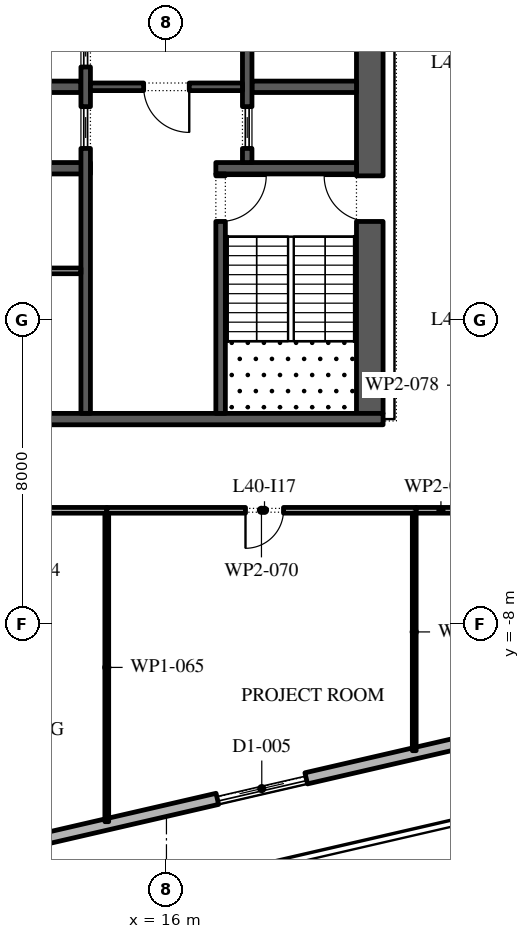
"""IFC4 building model, lengths in metres.
Left out: names, types, materials, properties, quantities, classifications, styles, units other than length and angle.
Written with IfcOpenShell. Run it as: python <this file> out.ifc"""

import sys

from ifc_helpers import new_model, si_unit, direction, frame, frame_2d, origin, place, context, subcontext, project, spatial, rectangle, extrude, element, fill, save


model = new_model("IFC4")
c1 = context("Model", 3, precision=1e-05, world=origin(), true_north=direction((0.0, 1.0)))
c2 = subcontext(c1, "Body", "Model", "MODEL_VIEW")
j1 = project(units=[si_unit("LENGTHUNIT", "METRE"), si_unit("PLANEANGLEUNIT", "RADIAN")], contexts=[c1])
p1 = place(None, origin())
s1 = spatial("IfcSite", under=j1, at=p1, CompositionType="ELEMENT")
p2 = place(p1, origin())
s2 = spatial("IfcBuilding", under=s1, at=p2, CompositionType="ELEMENT")
p3 = place(p2, frame((0.0, 0.0, 184.2)))
s3 = spatial("IfcBuildingStorey", under=s2, at=p3, CompositionType="ELEMENT", Elevation=184.2)
p4 = place(p3, frame((-17.592, -20.657, 0.0), z_axis=(0.0, 0.0, 1.0), x_axis=(0.974370243697, 0.224950279389, 0.0)))
e1 = element("IfcWall", 1, at=p4, inside=s3, PredefinedType="STANDARD", context=c2, shape_type="SweptSolid", body=[
    extrude(rectangle(XDim=49.5, YDim=0.3, at=frame_2d((24.75, 0.0))), origin(), (0.0, 0.0, 1.0), 4.0),
])
p5 = place(p4, frame((2.8, 0.0, 0.0)))
e2 = element("IfcOpeningElement", 2, at=p5, cuts=e1, PredefinedType="OPENING", context=c2, shape_type="SweptSolid", body=[
    extrude(rectangle(XDim=2.4, YDim=3.5, at=frame_2d((1.2, 1.75))), frame((0.0, 0.16, 0.0), z_axis=(0.0, -1.0, 0.0), x_axis=(1.0, 0.0, 0.0)), (0.0, 0.0, 1.0), 0.32),
])
p6 = place(p4, frame((9.9, 0.0, 0.45)))
e3 = element("IfcOpeningElement", 3, at=p6, cuts=e1, PredefinedType="OPENING", context=c2, shape_type="SweptSolid", body=[
    extrude(rectangle(XDim=4.5, YDim=2.575, at=frame_2d((2.25, 1.288))), frame((0.0, 0.16, 0.0), z_axis=(0.0, -1.0, 0.0), x_axis=(1.0, 0.0, 0.0)), (0.0, 0.0, 1.0), 0.32),
])
p7 = place(p4, frame((18.2, 0.0, 0.45)))
e4 = element("IfcOpeningElement", 4, at=p7, cuts=e1, PredefinedType="OPENING", context=c2, shape_type="SweptSolid", body=[
    extrude(rectangle(XDim=4.5, YDim=3.05, at=frame_2d((2.25, 1.525))), frame((0.0, 0.16, 0.0), z_axis=(0.0, -1.0, 0.0), x_axis=(1.0, 0.0, 0.0)), (0.0, 0.0, 1.0), 0.32),
])
p8 = place(p4, frame((26.5, 0.0, 0.45)))
e5 = element("IfcOpeningElement", 5, at=p8, cuts=e1, PredefinedType="OPENING", context=c2, shape_type="SweptSolid", body=[
    extrude(rectangle(XDim=4.5, YDim=2.75, at=frame_2d((2.25, 1.375))), frame((0.0, 0.16, 0.0), z_axis=(0.0, -1.0, 0.0), x_axis=(1.0, 0.0, 0.0)), (0.0, 0.0, 1.0), 0.32),
])
p9 = place(p4, frame((35.85, 0.0, 0.0)))
e6 = element("IfcOpeningElement", 6, at=p9, cuts=e1, PredefinedType="OPENING", context=c2, shape_type="SweptSolid", body=[
    extrude(rectangle(XDim=2.4, YDim=3.5, at=frame_2d((1.2, 1.75))), frame((0.0, 0.16, 0.0), z_axis=(0.0, -1.0, 0.0), x_axis=(1.0, 0.0, 0.0)), (0.0, 0.0, 1.0), 0.32),
])
p10 = place(p4, frame((43.1, 0.0, 0.45)))
e7 = element("IfcOpeningElement", 7, at=p10, cuts=e1, PredefinedType="OPENING", context=c2, shape_type="SweptSolid", body=[
    extrude(rectangle(XDim=4.5, YDim=2.875, at=frame_2d((2.25, 1.438))), frame((0.0, 0.16, 0.0), z_axis=(0.0, -1.0, 0.0), x_axis=(1.0, 0.0, 0.0)), (0.0, 0.0, 1.0), 0.32),
])
p11 = place(p3, frame((33.157, -5.092, 0.0), z_axis=(0.0, 0.0, 1.0), x_axis=(-0.224950279389, 0.974370243697, 0.0)))
e8 = element("IfcWall", 8, at=p11, inside=s3, PredefinedType="STANDARD", context=c2, shape_type="SweptSolid", body=[
    extrude(rectangle(XDim=49.5, YDim=0.3, at=frame_2d((24.75, 0.0))), origin(), (0.0, 0.0, 1.0), 4.0),
])
p12 = place(p11, frame((2.207, 0.0, 0.0)))
e9 = element("IfcOpeningElement", 9, at=p12, cuts=e8, PredefinedType="OPENING", context=c2, shape_type="SweptSolid", body=[
    extrude(rectangle(XDim=2.4, YDim=3.125, at=frame_2d((1.2, 1.562))), frame((0.0, 0.16, 0.0), z_axis=(0.0, -1.0, 0.0), x_axis=(1.0, 0.0, 0.0)), (0.0, 0.0, 1.0), 0.32),
])
p13 = place(p11, frame((8.121, 0.0, 0.45)))
e10 = element("IfcOpeningElement", 10, at=p13, cuts=e8, PredefinedType="OPENING", context=c2, shape_type="SweptSolid", body=[
    extrude(rectangle(XDim=4.5, YDim=2.875, at=frame_2d((2.25, 1.438))), frame((0.0, 0.16, 0.0), z_axis=(0.0, -1.0, 0.0), x_axis=(1.0, 0.0, 0.0)), (0.0, 0.0, 1.0), 0.32),
])
p14 = place(p11, frame((15.236, 0.0, 0.45)))
e11 = element("IfcOpeningElement", 11, at=p14, cuts=e8, PredefinedType="OPENING", context=c2, shape_type="SweptSolid", body=[
    extrude(rectangle(XDim=4.5, YDim=2.875, at=frame_2d((2.25, 1.438))), frame((0.0, 0.16, 0.0), z_axis=(0.0, -1.0, 0.0), x_axis=(1.0, 0.0, 0.0)), (0.0, 0.0, 1.0), 0.32),
])
p15 = place(p11, frame((22.35, 0.0, 0.45)))
e12 = element("IfcOpeningElement", 12, at=p15, cuts=e8, PredefinedType="OPENING", context=c2, shape_type="SweptSolid", body=[
    extrude(rectangle(XDim=4.5, YDim=3.0, at=frame_2d((2.25, 1.5))), frame((0.0, 0.16, 0.0), z_axis=(0.0, -1.0, 0.0), x_axis=(1.0, 0.0, 0.0)), (0.0, 0.0, 1.0), 0.32),
])
p16 = place(p11, frame((30.514, 0.0, 0.0)))
e13 = element("IfcOpeningElement", 13, at=p16, cuts=e8, PredefinedType="OPENING", context=c2, shape_type="SweptSolid", body=[
    extrude(rectangle(XDim=2.4, YDim=3.45, at=frame_2d((1.2, 1.725))), frame((0.0, 0.16, 0.0), z_axis=(0.0, -1.0, 0.0), x_axis=(1.0, 0.0, 0.0)), (0.0, 0.0, 1.0), 0.32),
])
p17 = place(p11, frame((36.579, 0.0, 0.45)))
e14 = element("IfcOpeningElement", 14, at=p17, cuts=e8, PredefinedType="OPENING", context=c2, shape_type="SweptSolid", body=[
    extrude(rectangle(XDim=4.5, YDim=3.05, at=frame_2d((2.25, 1.525))), frame((0.0, 0.16, 0.0), z_axis=(0.0, -1.0, 0.0), x_axis=(1.0, 0.0, 0.0)), (0.0, 0.0, 1.0), 0.32),
])
p18 = place(p11, frame((43.693, 0.0, 0.45)))
e15 = element("IfcOpeningElement", 15, at=p18, cuts=e8, PredefinedType="OPENING", context=c2, shape_type="SweptSolid", body=[
    extrude(rectangle(XDim=4.5, YDim=3.05, at=frame_2d((2.25, 1.525))), frame((0.0, 0.16, 0.0), z_axis=(0.0, -1.0, 0.0), x_axis=(1.0, 0.0, 0.0)), (0.0, 0.0, 1.0), 0.32),
])
p19 = place(p3, frame((21.35, -2.45, 0.0), z_axis=(0.0, 0.0, 1.0), x_axis=(0.0, 1.0, 0.0)))
e16 = element("IfcWall", 16, at=p19, inside=s3, PredefinedType="SHEAR", context=c2, shape_type="SweptSolid", body=[
    extrude(rectangle(XDim=27.9, YDim=0.7, at=frame_2d((13.95, 0.0))), origin(), (0.0, 0.0, 1.0), 4.0),
])
p20 = place(p19, frame((5.05, 0.0, 0.0)))
e17 = element("IfcOpeningElement", 17, at=p20, cuts=e16, PredefinedType="OPENING", context=c2, shape_type="SweptSolid", body=[
    extrude(rectangle(XDim=1.2, YDim=2.1, at=frame_2d((0.6, 1.05))), frame((0.0, 0.36, 0.0), z_axis=(0.0, -1.0, 0.0), x_axis=(1.0, 0.0, 0.0)), (0.0, 0.0, 1.0), 0.72),
])
p21 = place(p19, frame((21.65, 0.0, 0.0)))
e18 = element("IfcOpeningElement", 18, at=p21, cuts=e16, PredefinedType="OPENING", context=c2, shape_type="SweptSolid", body=[
    extrude(rectangle(XDim=1.2, YDim=2.1, at=frame_2d((0.6, 1.05))), frame((0.0, 0.36, 0.0), z_axis=(0.0, -1.0, 0.0), x_axis=(1.0, 0.0, 0.0)), (0.0, 0.0, 1.0), 0.72),
])
p22 = place(p3, frame((10.3, -2.6, 0.0), z_axis=(0.0, 0.0, 1.0), x_axis=(1.0, 0.0, 0.0)))
e19 = element("IfcWall", 19, at=p22, inside=s3, PredefinedType="SHEAR", context=c2, shape_type="SweptSolid", body=[
    extrude(rectangle(XDim=11.4, YDim=0.3, at=frame_2d((5.7, 0.0))), origin(), (0.0, 0.0, 1.0), 4.0),
])
p23 = place(p3, frame((17.3, 4.0, 0.0), z_axis=(0.0, 0.0, 1.0), x_axis=(1.0, 0.0, 0.0)))
e20 = element("IfcWall", 20, at=p23, inside=s3, PredefinedType="SHEAR", context=c2, shape_type="SweptSolid", body=[
    extrude(rectangle(XDim=3.7, YDim=0.3, at=frame_2d((1.85, 0.0))), origin(), (0.0, 0.0, 1.0), 4.0),
])
p24 = place(p3, frame((17.425, -2.45, 0.0), z_axis=(0.0, 0.0, 1.0), x_axis=(0.0, 1.0, 0.0)))
e21 = element("IfcWall", 21, at=p24, inside=s3, PredefinedType="SHEAR", context=c2, shape_type="SweptSolid", body=[
    extrude(rectangle(XDim=6.3, YDim=0.25, at=frame_2d((3.15, 0.0))), origin(), (0.0, 0.0, 1.0), 4.0),
])
p25 = place(p24, frame((5.05, 0.0, 0.0)))
e22 = element("IfcOpeningElement", 22, at=p25, cuts=e21, PredefinedType="OPENING", context=c2, shape_type="SweptSolid", body=[
    extrude(rectangle(XDim=1.2, YDim=2.1, at=frame_2d((0.6, 1.05))), frame((0.0, 0.135, 0.0), z_axis=(0.0, -1.0, 0.0), x_axis=(1.0, 0.0, 0.0)), (0.0, 0.0, 1.0), 0.27),
])
p26 = place(p3, frame((18.25, 6.143, 0.0), z_axis=(0.0, 0.0, 1.0), x_axis=(1.0, 0.0, 0.0)))
e23 = element("IfcWall", 23, at=p26, inside=s3, PredefinedType="SHEAR", context=c2, shape_type="SweptSolid", body=[
    extrude(rectangle(XDim=2.75, YDim=0.3, at=frame_2d((1.375, 0.0))), origin(), (0.0, 0.0, 1.0), 4.0),
])
p27 = place(p3, frame((18.125, 4.15, 0.0), z_axis=(0.0, 0.0, 1.0), x_axis=(0.0, 1.0, 0.0)))
e24 = element("IfcWall", 24, at=p27, inside=s3, PredefinedType="SHEAR", context=c2, shape_type="SweptSolid", body=[
    extrude(rectangle(XDim=14.7, YDim=0.25, at=frame_2d((7.35, 0.0))), origin(), (0.0, 0.0, 1.0), 4.0),
])
p28 = place(p27, frame((3.446, 0.0, 0.0)))
e25 = element("IfcOpeningElement", 25, at=p28, cuts=e24, PredefinedType="OPENING", context=c2, shape_type="SweptSolid", body=[
    extrude(rectangle(XDim=0.9, YDim=2.1, at=frame_2d((0.45, 1.05))), frame((0.0, 0.135, 0.0), z_axis=(0.0, -1.0, 0.0), x_axis=(1.0, 0.0, 0.0)), (0.0, 0.0, 1.0), 0.27),
])
p29 = place(p27, frame((6.9, 0.0, 0.0)))
e26 = element("IfcOpeningElement", 26, at=p29, cuts=e24, PredefinedType="OPENING", context=c2, shape_type="SweptSolid", body=[
    extrude(rectangle(XDim=0.9, YDim=2.1, at=frame_2d((0.45, 1.05))), frame((0.0, 0.135, 0.0), z_axis=(0.0, -1.0, 0.0), x_axis=(1.0, 0.0, 0.0)), (0.0, 0.0, 1.0), 0.27),
])
p30 = place(p27, frame((10.354, 0.0, 0.0)))
e27 = element("IfcOpeningElement", 27, at=p30, cuts=e24, PredefinedType="OPENING", context=c2, shape_type="SweptSolid", body=[
    extrude(rectangle(XDim=0.9, YDim=2.1, at=frame_2d((0.45, 1.05))), frame((0.0, 0.135, 0.0), z_axis=(0.0, -1.0, 0.0), x_axis=(1.0, 0.0, 0.0)), (0.0, 0.0, 1.0), 0.27),
])
p31 = place(p27, frame((0.371, 0.0, 0.0)))
e28 = element("IfcOpeningElement", 28, at=p31, cuts=e24, PredefinedType="OPENING", context=c2, shape_type="SweptSolid", body=[
    extrude(rectangle(XDim=1.1, YDim=2.1, at=frame_2d((0.55, 1.05))), frame((0.0, 0.135, 0.0), z_axis=(0.0, -1.0, 0.0), x_axis=(1.0, 0.0, 0.0)), (0.0, 0.0, 1.0), 0.27),
])
p32 = place(p27, frame((13.229, 0.0, 0.0)))
e29 = element("IfcOpeningElement", 29, at=p32, cuts=e24, PredefinedType="OPENING", context=c2, shape_type="SweptSolid", body=[
    extrude(rectangle(XDim=1.1, YDim=2.1, at=frame_2d((0.55, 1.05))), frame((0.0, 0.135, 0.0), z_axis=(0.0, -1.0, 0.0), x_axis=(1.0, 0.0, 0.0)), (0.0, 0.0, 1.0), 0.27),
])
p33 = place(p3, frame((11.0, 4.0, 0.0), z_axis=(0.0, 0.0, 1.0), x_axis=(1.0, 0.0, 0.0)))
e30 = element("IfcWall", 30, at=p33, inside=s3, PredefinedType="SHEAR", context=c2, shape_type="SweptSolid", body=[
    extrude(rectangle(XDim=3.0, YDim=0.3, at=frame_2d((1.5, 0.0))), origin(), (0.0, 0.0, 1.0), 4.0),
])
p34 = place(p3, frame((11.0, 6.143, 0.0), z_axis=(0.0, 0.0, 1.0), x_axis=(1.0, 0.0, 0.0)))
e31 = element("IfcWall", 31, at=p34, inside=s3, PredefinedType="SHEAR", context=c2, shape_type="SweptSolid", body=[
    extrude(rectangle(XDim=2.75, YDim=0.3, at=frame_2d((1.375, 0.0))), origin(), (0.0, 0.0, 1.0), 4.0),
])
p35 = place(p3, frame((13.875, -2.45, 0.0), z_axis=(0.0, 0.0, 1.0), x_axis=(0.0, 1.0, 0.0)))
e32 = element("IfcWall", 32, at=p35, inside=s3, PredefinedType="SHEAR", context=c2, shape_type="SweptSolid", body=[
    extrude(rectangle(XDim=21.3, YDim=0.25, at=frame_2d((10.65, 0.0))), origin(), (0.0, 0.0, 1.0), 4.0),
])
p36 = place(p35, frame((17.786, 0.0, 0.0)))
e33 = element("IfcOpeningElement", 33, at=p36, cuts=e32, PredefinedType="OPENING", context=c2, shape_type="SweptSolid", body=[
    extrude(rectangle(XDim=0.9, YDim=2.1, at=frame_2d((0.45, 1.05))), frame((0.0, 0.135, 0.0), z_axis=(0.0, -1.0, 0.0), x_axis=(1.0, 0.0, 0.0)), (0.0, 0.0, 1.0), 0.27),
])
p37 = place(p35, frame((6.971, 0.0, 0.0)))
e34 = element("IfcOpeningElement", 34, at=p37, cuts=e32, PredefinedType="OPENING", context=c2, shape_type="SweptSolid", body=[
    extrude(rectangle(XDim=1.1, YDim=2.1, at=frame_2d((0.55, 1.05))), frame((0.0, 0.135, 0.0), z_axis=(0.0, -1.0, 0.0), x_axis=(1.0, 0.0, 0.0)), (0.0, 0.0, 1.0), 0.27),
])
p38 = place(p35, frame((9.114, 0.0, 0.0)))
e35 = element("IfcOpeningElement", 35, at=p38, cuts=e32, PredefinedType="OPENING", context=c2, shape_type="SweptSolid", body=[
    extrude(rectangle(XDim=1.1, YDim=2.1, at=frame_2d((0.55, 1.05))), frame((0.0, 0.135, 0.0), z_axis=(0.0, -1.0, 0.0), x_axis=(1.0, 0.0, 0.0)), (0.0, 0.0, 1.0), 0.27),
])
p39 = place(p35, frame((11.257, 0.0, 0.0)))
e36 = element("IfcOpeningElement", 36, at=p39, cuts=e32, PredefinedType="OPENING", context=c2, shape_type="SweptSolid", body=[
    extrude(rectangle(XDim=1.1, YDim=2.1, at=frame_2d((0.55, 1.05))), frame((0.0, 0.135, 0.0), z_axis=(0.0, -1.0, 0.0), x_axis=(1.0, 0.0, 0.0)), (0.0, 0.0, 1.0), 0.27),
])
p40 = place(p35, frame((13.4, 0.0, 0.0)))
e37 = element("IfcOpeningElement", 37, at=p40, cuts=e32, PredefinedType="OPENING", context=c2, shape_type="SweptSolid", body=[
    extrude(rectangle(XDim=1.1, YDim=2.1, at=frame_2d((0.55, 1.05))), frame((0.0, 0.135, 0.0), z_axis=(0.0, -1.0, 0.0), x_axis=(1.0, 0.0, 0.0)), (0.0, 0.0, 1.0), 0.27),
])
p41 = place(p3, frame((14.0, 6.143, 0.0), z_axis=(0.0, 0.0, 1.0), x_axis=(1.0, 0.0, 0.0)))
e38 = element("IfcWall", 38, at=p41, inside=s3, PredefinedType="SHEAR", context=c2, shape_type="SweptSolid", body=[
    extrude(rectangle(XDim=4.0, YDim=0.2, at=frame_2d((2.0, 0.0))), origin(), (0.0, 0.0, 1.0), 4.0),
])
p42 = place(p41, frame((1.4, 0.0, 0.0)))
e39 = element("IfcOpeningElement", 39, at=p42, cuts=e38, PredefinedType="OPENING", context=c2, shape_type="SweptSolid", body=[
    extrude(rectangle(XDim=1.2, YDim=2.1, at=frame_2d((0.6, 1.05))), frame((0.0, 0.11, 0.0), z_axis=(0.0, -1.0, 0.0), x_axis=(1.0, 0.0, 0.0)), (0.0, 0.0, 1.0), 0.22),
])
p43 = place(p3, frame((11.0, 1.3, 0.0), z_axis=(0.0, 0.0, 1.0), x_axis=(1.0, 0.0, 0.0)))
e40 = element("IfcWall", 40, at=p43, inside=s3, PredefinedType="PARTITIONING", context=c2, shape_type="SweptSolid", body=[
    extrude(rectangle(XDim=2.75, YDim=0.15, at=frame_2d((1.375, 0.0))), origin(), (0.0, 0.0, 1.0), 4.0),
])
p44 = place(p3, frame((14.43, -5.0, 0.0), z_axis=(0.0, 0.0, 1.0), x_axis=(-1.0, 0.0, 0.0)))
e41 = element("IfcWall", 41, at=p44, inside=s3, PredefinedType="PARTITIONING", context=c2, shape_type="SweptSolid", body=[
    extrude(rectangle(XDim=4.43, YDim=0.15, at=frame_2d((2.215, 0.0))), origin(), (0.0, 0.0, 1.0), 4.0),
])
p45 = place(p44, frame((2.53, 0.0, 0.0)))
e42 = element("IfcOpeningElement", 42, at=p45, cuts=e41, PredefinedType="OPENING", context=c2, shape_type="SweptSolid", body=[
    extrude(rectangle(XDim=1.0, YDim=2.1, at=frame_2d((0.5, 1.05))), frame((0.0, 0.085, 0.0), z_axis=(0.0, -1.0, 0.0), x_axis=(1.0, 0.0, 0.0)), (0.0, 0.0, 1.0), 0.17),
])
p46 = place(p3, frame((14.43, -5.075, 0.0), z_axis=(0.0, 0.0, 1.0), x_axis=(0.0, -1.0, 0.0)))
e43 = element("IfcWall", 43, at=p46, inside=s3, PredefinedType="PARTITIONING", context=c2, shape_type="SweptSolid", body=[
    extrude(rectangle(XDim=8.118, YDim=0.1, at=frame_2d((4.059, 0.0))), origin(), (0.0, 0.0, 1.0), 4.0),
])
p47 = place(p3, frame((22.57, -5.0, 0.0), z_axis=(0.0, 0.0, 1.0), x_axis=(-1.0, 0.0, 0.0)))
e44 = element("IfcWall", 44, at=p47, inside=s3, PredefinedType="PARTITIONING", context=c2, shape_type="SweptSolid", body=[
    extrude(rectangle(XDim=8.14, YDim=0.15, at=frame_2d((4.07, 0.0))), origin(), (0.0, 0.0, 1.0), 4.0),
])
p48 = place(p47, frame((3.49, 0.0, 0.0)))
e45 = element("IfcOpeningElement", 45, at=p48, cuts=e44, PredefinedType="OPENING", context=c2, shape_type="SweptSolid", body=[
    extrude(rectangle(XDim=1.0, YDim=2.1, at=frame_2d((0.5, 1.05))), frame((0.0, 0.085, 0.0), z_axis=(0.0, -1.0, 0.0), x_axis=(1.0, 0.0, 0.0)), (0.0, 0.0, 1.0), 0.17),
])
p49 = place(p3, frame((22.52, -5.075, 0.0), z_axis=(0.0, 0.0, 1.0), x_axis=(0.0, -1.0, 0.0)))
e46 = element("IfcWall", 46, at=p49, inside=s3, PredefinedType="PARTITIONING", context=c2, shape_type="SweptSolid", body=[
    extrude(rectangle(XDim=6.25, YDim=0.1, at=frame_2d((3.125, 0.0))), origin(), (0.0, 0.0, 1.0), 4.0),
])
p50 = place(p3, frame((23.875, -5.0, 0.0), z_axis=(0.0, 0.0, 1.0), x_axis=(-1.0, 0.0, 0.0)))
e47 = element("IfcWall", 47, at=p50, inside=s3, PredefinedType="PARTITIONING", context=c2, shape_type="SweptSolid", body=[
    extrude(rectangle(XDim=1.305, YDim=0.15, at=frame_2d((0.652, 0.0))), origin(), (0.0, 0.0, 1.0), 4.0),
])
p51 = place(p9, origin())
e48 = element("IfcDoor", 48, at=p51, inside=s3, OperationType="DOUBLE_DOOR_SLIDING", PredefinedType="DOOR", context=c2, shape_type="SweptSolid", body=[
    extrude(rectangle(XDim=2.4, YDim=3.5, at=frame_2d((1.2, 1.75))), frame((0.0, 0.025, 0.0), z_axis=(0.0, -1.0, 0.0), x_axis=(1.0, 0.0, 0.0)), (0.0, 0.0, 1.0), 0.05),
])
fill(e6, e48)
p52 = place(p31, origin())
e49 = element("IfcDoor", 49, at=p52, inside=s3, OperationType="SLIDING_TO_LEFT", PredefinedType="DOOR", context=c2, shape_type="SweptSolid", body=[
    extrude(rectangle(XDim=1.1, YDim=2.1, at=frame_2d((0.55, 1.05))), frame((0.0, 0.025, 0.0), z_axis=(0.0, -1.0, 0.0), x_axis=(1.0, 0.0, 0.0)), (0.0, 0.0, 1.0), 0.05),
])
fill(e28, e49)
p53 = place(p37, origin())
e50 = element("IfcDoor", 50, at=p53, inside=s3, OperationType="SLIDING_TO_LEFT", PredefinedType="DOOR", context=c2, shape_type="SweptSolid", body=[
    extrude(rectangle(XDim=1.1, YDim=2.1, at=frame_2d((0.55, 1.05))), frame((0.0, 0.025, 0.0), z_axis=(0.0, -1.0, 0.0), x_axis=(1.0, 0.0, 0.0)), (0.0, 0.0, 1.0), 0.05),
])
fill(e34, e50)
p54 = place(p38, origin())
e51 = element("IfcDoor", 51, at=p54, inside=s3, OperationType="SLIDING_TO_LEFT", PredefinedType="DOOR", context=c2, shape_type="SweptSolid", body=[
    extrude(rectangle(XDim=1.1, YDim=2.1, at=frame_2d((0.55, 1.05))), frame((0.0, 0.025, 0.0), z_axis=(0.0, -1.0, 0.0), x_axis=(1.0, 0.0, 0.0)), (0.0, 0.0, 1.0), 0.05),
])
fill(e35, e51)
p55 = place(p42, frame((1.2, 0.0, 0.0), z_axis=(0.0, 0.0, 1.0), x_axis=(-1.0, 0.0, 0.0)))
e52 = element("IfcDoor", 52, at=p55, inside=s3, OperationType="SINGLE_SWING_RIGHT", PredefinedType="DOOR", context=c2, shape_type="SweptSolid", body=[
    extrude(rectangle(XDim=1.2, YDim=2.1, at=frame_2d((0.6, 1.05))), frame((0.0, 0.025, 0.0), z_axis=(0.0, -1.0, 0.0), x_axis=(1.0, 0.0, 0.0)), (0.0, 0.0, 1.0), 0.05),
])
fill(e39, e52)
p56 = place(p25, frame((1.2, 0.0, 0.0), z_axis=(0.0, 0.0, 1.0), x_axis=(-1.0, 0.0, 0.0)))
e53 = element("IfcDoor", 53, at=p56, inside=s3, OperationType="SINGLE_SWING_RIGHT", PredefinedType="DOOR", context=c2, shape_type="SweptSolid", body=[
    extrude(rectangle(XDim=1.2, YDim=2.1, at=frame_2d((0.6, 1.05))), frame((0.0, 0.025, 0.0), z_axis=(0.0, -1.0, 0.0), x_axis=(1.0, 0.0, 0.0)), (0.0, 0.0, 1.0), 0.05),
])
fill(e22, e53)
p57 = place(p20, origin())
e54 = element("IfcDoor", 54, at=p57, inside=s3, OperationType="SINGLE_SWING_LEFT", PredefinedType="DOOR", context=c2, shape_type="SweptSolid", body=[
    extrude(rectangle(XDim=1.2, YDim=2.1, at=frame_2d((0.6, 1.05))), frame((0.0, 0.025, 0.0), z_axis=(0.0, -1.0, 0.0), x_axis=(1.0, 0.0, 0.0)), (0.0, 0.0, 1.0), 0.05),
])
fill(e17, e54)
p58 = place(p48, origin())
e55 = element("IfcDoor", 55, at=p58, inside=s3, OperationType="SINGLE_SWING_LEFT", PredefinedType="DOOR", context=c2, shape_type="SweptSolid", body=[
    extrude(rectangle(XDim=1.0, YDim=2.1, at=frame_2d((0.5, 1.05))), frame((0.0, 0.025, 0.0), z_axis=(0.0, -1.0, 0.0), x_axis=(1.0, 0.0, 0.0)), (0.0, 0.0, 1.0), 0.05),
])
fill(e45, e55)
save(model, sys.argv[1])
